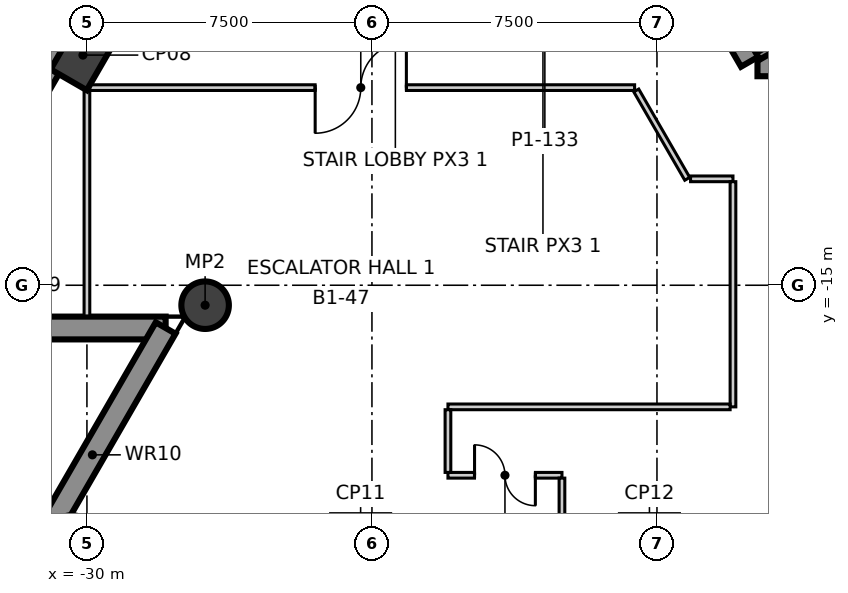
"""IFC4 building model, lengths in metres.
Left out: names, types, materials, properties, quantities, classifications, styles, units other than length and angle.
Written with IfcOpenShell. Run it as: python <this file> out.ifc"""

import sys

from ifc_helpers import new_model, si_unit, direction, frame, frame_2d, origin, origin_2d, place, context, subcontext, project, spatial, polyline, rectangle, circle, outline, extrude, element, fill, save


model = new_model("IFC4")
c1 = context("Model", 3, precision=1e-05, world=origin(), true_north=direction((0.0, 1.0)))
c2 = subcontext(c1, "Body", "Model", "MODEL_VIEW")
j1 = project(units=[si_unit("LENGTHUNIT", "METRE"), si_unit("PLANEANGLEUNIT", "RADIAN")], contexts=[c1])
p1 = place(None, origin())
s1 = spatial("IfcSite", under=j1, at=p1, CompositionType="ELEMENT")
p2 = place(p1, origin())
s2 = spatial("IfcBuilding", under=s1, at=p2, CompositionType="ELEMENT")
p3 = place(p2, frame((0.0, 0.0, -5.5)))
s3 = spatial("IfcBuildingStorey", under=s2, at=p3, CompositionType="ELEMENT", Elevation=-5.5)
p4 = place(p3, frame((-3.507, 38.325, -0.4), z_axis=(0.0, 0.0, 1.0), x_axis=(-0.500003790369, -0.866023215403, 0.0)))
e1 = element("IfcWall", 1, at=p4, inside=s3, PredefinedType="SOLIDWALL", context=c2, shape_type="SweptSolid", body=[
    extrude(rectangle(XDim=62.874, YDim=0.6, at=frame_2d((31.437, 0.0))), origin(), (0.0, 0.0, 1.0), 5.5),
])
p5 = place(p3, frame((-34.944, -16.125, -0.4), z_axis=(0.0, 0.0, 1.0), x_axis=(1.0, 0.0, 0.0)))
e2 = element("IfcWall", 2, at=p5, inside=s3, PredefinedType="SOLIDWALL", context=c2, shape_type="SweptSolid", body=[
    extrude(rectangle(XDim=7.015, YDim=0.6, at=frame_2d((3.508, 0.0))), origin(), (0.0, 0.0, 1.0), 5.5),
])
p6 = place(p3, frame((-27.929, -16.125, -0.4), z_axis=(0.0, 0.0, 1.0), x_axis=(-0.500015828289, -0.866016265125, 0.0)))
e3 = element("IfcWall", 3, at=p6, inside=s3, PredefinedType="SOLIDWALL", context=c2, shape_type="SweptSolid", body=[
    extrude(rectangle(XDim=7.708, YDim=0.6, at=frame_2d((3.854, 0.0))), origin(), (0.0, 0.0, 1.0), 5.5),
])
p7 = place(p3, frame((-13.972, -6.2, -0.4), z_axis=(0.0, 0.0, 1.0), x_axis=(0.500077567175, -0.865980615723, 0.0)))
e4 = element("IfcWall", 4, at=p7, inside=s3, PredefinedType="SHEAR", context=c2, shape_type="SweptSolid", body=[
    extrude(outline(polyline([(-0.289, -0.5), (1.616, -0.5), (3.522, -0.5), (2.944, 0.499), (1.617, 0.5), (0.289, 0.5), (-0.289, -0.5)])), origin(), (0.0, 0.0, 1.0), 5.5),
])
p8 = place(p7, frame((0.917, 0.0, 0.4)))
e5 = element("IfcOpeningElement", 5, at=p8, cuts=e4, PredefinedType="OPENING", context=c2, shape_type="SweptSolid", body=[
    extrude(rectangle(XDim=1.4, YDim=2.1, at=frame_2d((0.7, 1.05))), frame((0.0, 0.51, 0.0), z_axis=(0.0, -1.0, 0.0), x_axis=(1.0, 0.0, 0.0)), (0.0, 0.0, 1.0), 1.02),
])
p9 = place(p3, frame((-12.355, -9.0, -0.4), z_axis=(0.0, 0.0, 1.0), x_axis=(1.0, 0.0, 0.0)))
e6 = element("IfcWall", 6, at=p9, inside=s3, PredefinedType="SHEAR", context=c2, shape_type="SweptSolid", body=[
    extrude(outline(polyline([(-0.289, -0.5), (1.656, -0.5), (3.601, -0.5), (5.547, -0.5), (7.492, -0.5), (9.437, -0.5), (11.382, -0.5), (13.328, -0.5), (15.273, -0.5), (17.218, -0.5), (19.163, -0.5), (21.109, -0.5), (23.054, -0.5), (24.999, -0.5), (24.422, 0.5), (22.566, 0.5), (20.709, 0.5), (18.853, 0.5), (16.996, 0.5), (15.14, 0.5), (13.283, 0.5), (11.427, 0.5), (9.57, 0.5), (7.714, 0.5), (5.857, 0.5), (4.001, 0.5), (2.145, 0.5), (0.288, 0.5), (-0.289, -0.5)])), origin(), (0.0, 0.0, 1.0), 5.5),
])
p10 = place(p9, frame((11.455, 0.0, 0.4)))
e7 = element("IfcOpeningElement", 7, at=p10, cuts=e6, PredefinedType="OPENING", context=c2, shape_type="SweptSolid", body=[
    extrude(rectangle(XDim=1.8, YDim=2.1, at=frame_2d((0.9, 1.05))), frame((0.0, 0.51, 0.0), z_axis=(0.0, -1.0, 0.0), x_axis=(1.0, 0.0, 0.0)), (0.0, 0.0, 1.0), 1.02),
])
p11 = place(p3, frame((-30.105, -8.944, -0.4), z_axis=(0.0, 0.0, 1.0), x_axis=(0.5, 0.866025403784, 0.0)))
e8 = element("IfcColumn", 8, at=p11, inside=s3, PredefinedType="COLUMN", context=c2, shape_type="SweptSolid", body=[
    extrude(rectangle(XDim=1.5, YDim=1.1, at=origin_2d()), origin(), (0.0, 0.0, 1.0), 5.5),
])
p12 = place(p3, frame((-26.89, -15.525, -0.4), z_axis=(0.0, 0.0, 1.0), x_axis=(1.0, 0.0, 0.0)))
e9 = element("IfcColumn", 9, at=p12, inside=s3, PredefinedType="COLUMN", context=c2, shape_type="SweptSolid", body=[
    extrude(circle(Radius=0.625, at=origin_2d()), origin(), (0.0, 0.0, 1.0), 5.5),
])
p13 = place(p3, frame((-20.5, -20.0, 0.0), z_axis=(0.0, 0.0, 1.0), x_axis=(1.0, 0.0, 0.0)))
e10 = element("IfcWall", 10, at=p13, inside=s3, PredefinedType="PARTITIONING", context=c2, shape_type="SweptSolid", body=[
    extrude(rectangle(XDim=3.0, YDim=0.15, at=frame_2d((1.5, 0.0))), origin(), (0.0, 0.0, 1.0), 5.1),
])
p14 = place(p13, frame((0.7, 0.0, 0.0)))
e11 = element("IfcOpeningElement", 11, at=p14, cuts=e10, PredefinedType="OPENING", context=c2, shape_type="SweptSolid", body=[
    extrude(rectangle(XDim=1.6, YDim=2.1, at=frame_2d((0.8, 1.05))), frame((0.0, 0.085, 0.0), z_axis=(0.0, -1.0, 0.0), x_axis=(1.0, 0.0, 0.0)), (0.0, 0.0, 1.0), 0.17),
])
p15 = place(p3, frame((-17.5, -25.0, 0.0), z_axis=(0.0, 0.0, 1.0), x_axis=(0.0, 1.0, 0.0)))
e12 = element("IfcWall", 12, at=p15, inside=s3, PredefinedType="PARTITIONING", context=c2, shape_type="SweptSolid", body=[
    extrude(rectangle(XDim=4.925, YDim=0.15, at=frame_2d((2.462, 0.0))), origin(), (0.0, 0.0, 1.0), 5.1),
])
p16 = place(p3, frame((-30.0, -15.825, 0.0), z_axis=(0.0, 0.0, 1.0), x_axis=(0.0, 1.0, 0.0)))
e13 = element("IfcWall", 13, at=p16, inside=s3, PredefinedType="PARTITIONING", context=c2, shape_type="SweptSolid", body=[
    extrude(rectangle(XDim=6.025, YDim=0.15, at=frame_2d((3.012, 0.0))), origin(), (0.0, 0.0, 1.0), 5.1),
])
p17 = place(p3, frame((-29.925, -9.8, 0.0), z_axis=(0.0, 0.0, 1.0), x_axis=(1.0, 0.0, 0.0)))
e14 = element("IfcWall", 14, at=p17, inside=s3, PredefinedType="PARTITIONING", context=c2, shape_type="SweptSolid", body=[
    extrude(rectangle(XDim=14.337, YDim=0.15, at=frame_2d((7.168, 0.0))), origin(), (0.0, 0.0, 1.0), 5.1),
])
p18 = place(p17, frame((5.931, 0.0, 0.0)))
e15 = element("IfcOpeningElement", 15, at=p18, cuts=e14, PredefinedType="OPENING", context=c2, shape_type="SweptSolid", body=[
    extrude(rectangle(XDim=2.4, YDim=2.1, at=frame_2d((1.2, 1.05))), frame((0.0, 0.085, 0.0), z_axis=(0.0, -1.0, 0.0), x_axis=(1.0, 0.0, 0.0)), (0.0, 0.0, 1.0), 0.17),
])
p19 = place(p3, frame((-15.545, -9.875, 0.0), z_axis=(0.0, 0.0, 1.0), x_axis=(0.4999245174, -0.866068979298, 0.0)))
e16 = element("IfcWall", 16, at=p19, inside=s3, PredefinedType="PARTITIONING", context=c2, shape_type="SweptSolid", body=[
    extrude(rectangle(XDim=2.685, YDim=0.15, at=frame_2d((1.342, 0.0))), origin(), (0.0, 0.0, 1.0), 5.1),
])
p20 = place(p3, frame((-14.116, -12.2, 0.0), z_axis=(0.0, 0.0, 1.0), x_axis=(1.0, 0.0, 0.0)))
e17 = element("IfcWall", 17, at=p20, inside=s3, PredefinedType="PARTITIONING", context=c2, shape_type="SweptSolid", body=[
    extrude(rectangle(XDim=1.116, YDim=0.15, at=frame_2d((0.558, 0.0))), origin(), (0.0, 0.0, 1.0), 5.1),
])
p21 = place(p3, frame((-13.0, -18.2, 0.0), z_axis=(0.0, 0.0, 1.0), x_axis=(0.0, 1.0, 0.0)))
e18 = element("IfcWall", 18, at=p21, inside=s3, PredefinedType="PARTITIONING", context=c2, shape_type="SweptSolid", body=[
    extrude(rectangle(XDim=5.925, YDim=0.15, at=frame_2d((2.962, 0.0))), origin(), (0.0, 0.0, 1.0), 5.1),
])
p22 = place(p3, frame((-20.5, -18.2, 0.0), z_axis=(0.0, 0.0, 1.0), x_axis=(1.0, 0.0, 0.0)))
e19 = element("IfcWall", 19, at=p22, inside=s3, PredefinedType="PARTITIONING", context=c2, shape_type="SweptSolid", body=[
    extrude(rectangle(XDim=7.425, YDim=0.15, at=frame_2d((3.712, 0.0))), origin(), (0.0, 0.0, 1.0), 5.1),
])
p23 = place(p3, frame((-20.5, -19.925, 0.0), z_axis=(0.0, 0.0, 1.0), x_axis=(0.0, 1.0, 0.0)))
e20 = element("IfcWall", 20, at=p23, inside=s3, PredefinedType="PARTITIONING", context=c2, shape_type="SweptSolid", body=[
    extrude(rectangle(XDim=1.65, YDim=0.15, at=frame_2d((0.825, 0.0))), origin(), (0.0, 0.0, 1.0), 5.1),
])
p24 = place(p3, frame((-12.346, -8.976, 0.0), z_axis=(0.0, 0.0, 1.0), x_axis=(0.866006929508, 0.50003199702, 0.0)))
e21 = element("IfcWall", 21, at=p24, inside=s3, PredefinedType="SOLIDWALL", context=c2, shape_type="SweptSolid", body=[
    extrude(rectangle(XDim=8.58, YDim=0.2, at=frame_2d((4.29, 0.0))), origin(), (0.0, 0.0, 1.0), 5.1),
])
p25 = place(p14, origin())
e22 = element("IfcDoor", 22, at=p25, inside=s3, OperationType="DOUBLE_DOOR_SINGLE_SWING", PredefinedType="DOOR", context=c2, shape_type="SweptSolid", body=[
    extrude(rectangle(XDim=1.6, YDim=2.1, at=frame_2d((0.8, 1.05))), frame((0.0, 0.025, 0.0), z_axis=(0.0, -1.0, 0.0), x_axis=(1.0, 0.0, 0.0)), (0.0, 0.0, 1.0), 0.05),
])
fill(e11, e22)
p26 = place(p18, origin())
e23 = element("IfcDoor", 23, at=p26, inside=s3, OperationType="DOUBLE_DOOR_SINGLE_SWING", PredefinedType="DOOR", context=c2, shape_type="SweptSolid", body=[
    extrude(rectangle(XDim=2.4, YDim=2.1, at=frame_2d((1.2, 1.05))), frame((0.0, 0.025, 0.0), z_axis=(0.0, -1.0, 0.0), x_axis=(1.0, 0.0, 0.0)), (0.0, 0.0, 1.0), 0.05),
])
fill(e15, e23)
save(model, sys.argv[1])
